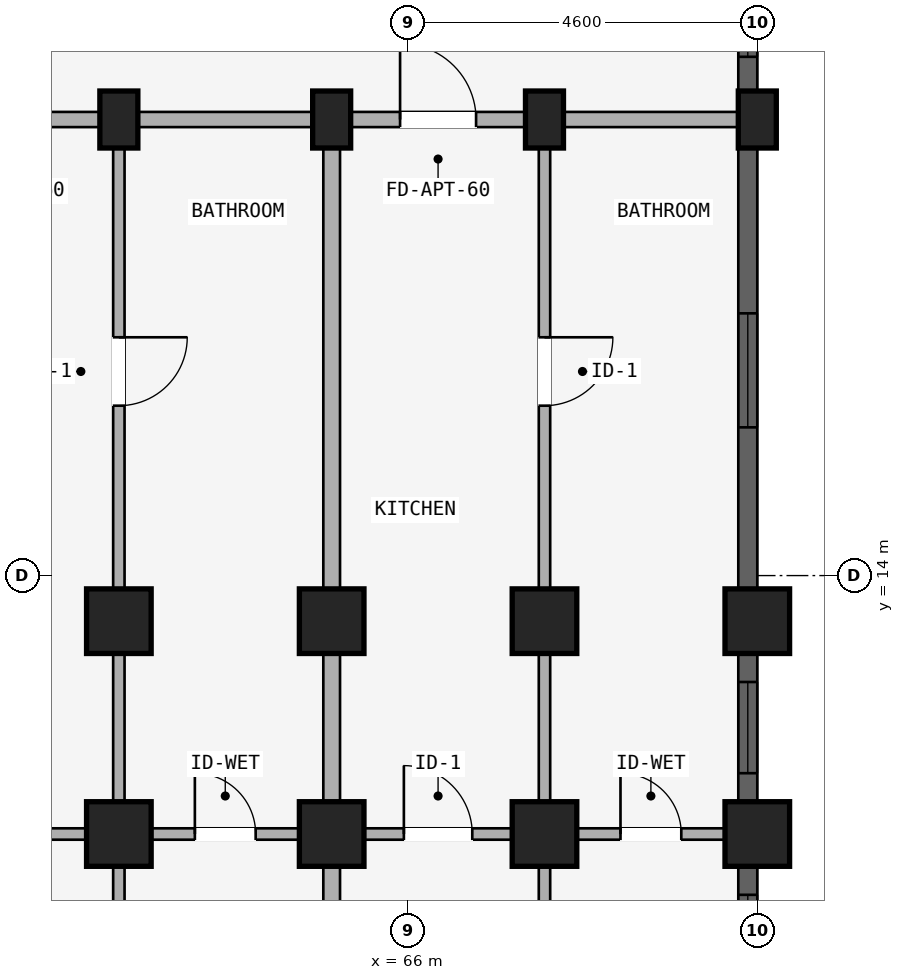
"""IFC4 building model, lengths in metres.
Left out: names, types, materials, properties, quantities, classifications, styles, units other than length and angle.
Written with IfcOpenShell. Run it as: python <this file> out.ifc"""

import sys

from ifc_helpers import new_model, si_unit, direction, frame, frame_2d, origin, origin_2d, place, context, subcontext, project, spatial, rectangle, extrude, element, fill, save


model = new_model("IFC4")
c1 = context("Model", 3, precision=1e-05, world=origin(), true_north=direction((0.0, 1.0)))
c2 = subcontext(c1, "Body", "Model", "MODEL_VIEW")
j1 = project(units=[si_unit("LENGTHUNIT", "METRE"), si_unit("PLANEANGLEUNIT", "RADIAN")], contexts=[c1])
p1 = place(None, origin())
s1 = spatial("IfcSite", under=j1, at=p1, CompositionType="ELEMENT")
p2 = place(p1, origin())
s2 = spatial("IfcBuilding", under=s1, at=p2, CompositionType="ELEMENT")
p3 = place(p2, frame((0.0, 0.0, 4.5)))
s3 = spatial("IfcBuildingStorey", under=s2, at=p3, CompositionType="ELEMENT", Elevation=4.5)
p4 = place(p3, frame((62.2, 20.0, 0.0), z_axis=(0.0, 0.0, 1.0), x_axis=(1.0, 0.0, 0.0)))
e1 = element("IfcColumn", 1, at=p4, inside=s3, PredefinedType="COLUMN", context=c2, shape_type="SweptSolid", body=[
    extrude(rectangle(XDim=0.5, YDim=0.75, at=origin_2d()), origin(), (0.0, 0.0, 1.0), 3.98),
])
for number, where, z_axis, x_axis in (
    (2, (62.2, 13.4, 0.0), (0.0, 0.0, 1.0), (1.0, 0.0, 0.0)),
    (3, (62.2, 10.6, 0.0), (0.0, 0.0, 1.0), (1.0, 0.0, 0.0)),
):
    element("IfcColumn", number, at=place(p3, frame(where, z_axis=z_axis, x_axis=x_axis)), inside=s3, PredefinedType="COLUMN", context=c2, shape_type="SweptSolid", body=[
        extrude(rectangle(XDim=0.85, YDim=0.85, at=origin_2d()), origin(), (0.0, 0.0, 1.0), 3.98),
    ])
p5 = place(p3, frame((65.0, 20.0, 0.0), z_axis=(0.0, 0.0, 1.0), x_axis=(1.0, 0.0, 0.0)))
e4 = element("IfcColumn", 4, at=p5, inside=s3, PredefinedType="COLUMN", context=c2, shape_type="SweptSolid", body=[
    extrude(rectangle(XDim=0.5, YDim=0.75, at=origin_2d()), origin(), (0.0, 0.0, 1.0), 3.98),
])
for number, where, z_axis, x_axis in (
    (5, (65.0, 13.4, 0.0), (0.0, 0.0, 1.0), (1.0, 0.0, 0.0)),
    (6, (65.0, 10.6, 0.0), (0.0, 0.0, 1.0), (1.0, 0.0, 0.0)),
):
    element("IfcColumn", number, at=place(p3, frame(where, z_axis=z_axis, x_axis=x_axis)), inside=s3, PredefinedType="COLUMN", context=c2, shape_type="SweptSolid", body=[
        extrude(rectangle(XDim=0.85, YDim=0.85, at=origin_2d()), origin(), (0.0, 0.0, 1.0), 3.98),
    ])
p6 = place(p3, frame((67.8, 20.0, 0.0), z_axis=(0.0, 0.0, 1.0), x_axis=(1.0, 0.0, 0.0)))
e7 = element("IfcColumn", 7, at=p6, inside=s3, PredefinedType="COLUMN", context=c2, shape_type="SweptSolid", body=[
    extrude(rectangle(XDim=0.5, YDim=0.75, at=origin_2d()), origin(), (0.0, 0.0, 1.0), 3.98),
])
for number, where, z_axis, x_axis in (
    (8, (67.8, 13.4, 0.0), (0.0, 0.0, 1.0), (1.0, 0.0, 0.0)),
    (9, (67.8, 10.6, 0.0), (0.0, 0.0, 1.0), (1.0, 0.0, 0.0)),
):
    element("IfcColumn", number, at=place(p3, frame(where, z_axis=z_axis, x_axis=x_axis)), inside=s3, PredefinedType="COLUMN", context=c2, shape_type="SweptSolid", body=[
        extrude(rectangle(XDim=0.85, YDim=0.85, at=origin_2d()), origin(), (0.0, 0.0, 1.0), 3.98),
    ])
p7 = place(p3, frame((70.6, 20.0, 0.0), z_axis=(0.0, 0.0, 1.0), x_axis=(1.0, 0.0, 0.0)))
e10 = element("IfcColumn", 10, at=p7, inside=s3, PredefinedType="COLUMN", context=c2, shape_type="SweptSolid", body=[
    extrude(rectangle(XDim=0.5, YDim=0.75, at=origin_2d()), origin(), (0.0, 0.0, 1.0), 3.98),
])
for number, where, z_axis, x_axis in (
    (11, (70.6, 13.4, 0.0), (0.0, 0.0, 1.0), (1.0, 0.0, 0.0)),
    (12, (70.6, 10.6, 0.0), (0.0, 0.0, 1.0), (1.0, 0.0, 0.0)),
):
    element("IfcColumn", number, at=place(p3, frame(where, z_axis=z_axis, x_axis=x_axis)), inside=s3, PredefinedType="COLUMN", context=c2, shape_type="SweptSolid", body=[
        extrude(rectangle(XDim=0.85, YDim=0.85, at=origin_2d()), origin(), (0.0, 0.0, 1.0), 3.98),
    ])
p8 = place(p3, frame((59.4, 20.0, 0.0), z_axis=(0.0, 0.0, 1.0), x_axis=(1.0, 0.0, 0.0)))
e13 = element("IfcWall", 13, at=p8, inside=s3, PredefinedType="STANDARD", context=c2, shape_type="SweptSolid", body=[
    extrude(rectangle(XDim=2.8, YDim=0.2, at=frame_2d((1.4, 0.0))), origin(), (0.0, 0.0, 1.0), 3.322),
])
p9 = place(p8, frame((0.9, 0.0, 0.0)))
e14 = element("IfcOpeningElement", 14, at=p9, cuts=e13, PredefinedType="OPENING", context=c2, shape_type="SweptSolid", body=[
    extrude(rectangle(XDim=1.0, YDim=2.15, at=frame_2d((0.5, 1.075))), frame((0.0, 0.11, 0.0), z_axis=(0.0, -1.0, 0.0), x_axis=(1.0, 0.0, 0.0)), (0.0, 0.0, 1.0), 0.22),
])
p10 = place(p3, frame((59.48, 10.6, 0.0), z_axis=(0.0, 0.0, 1.0), x_axis=(1.0, 0.0, 0.0)))
e15 = element("IfcWall", 15, at=p10, inside=s3, PredefinedType="PLUMBINGWALL", context=c2, shape_type="SweptSolid", body=[
    extrude(rectangle(XDim=2.64, YDim=0.15, at=frame_2d((1.32, 0.0))), origin(), (0.0, 0.0, 1.0), 3.322),
])
p11 = place(p10, frame((0.87, 0.0, 0.0)))
e16 = element("IfcOpeningElement", 16, at=p11, cuts=e15, PredefinedType="OPENING", context=c2, shape_type="SweptSolid", body=[
    extrude(rectangle(XDim=0.9, YDim=2.1, at=frame_2d((0.45, 1.05))), frame((0.0, 0.085, 0.0), z_axis=(0.0, -1.0, 0.0), x_axis=(1.0, 0.0, 0.0)), (0.0, 0.0, 1.0), 0.17),
])
p12 = place(p3, frame((62.2, 20.0, 0.0), z_axis=(0.0, 0.0, 1.0), x_axis=(1.0, 0.0, 0.0)))
e17 = element("IfcWall", 17, at=p12, inside=s3, PredefinedType="STANDARD", context=c2, shape_type="SweptSolid", body=[
    extrude(rectangle(XDim=2.8, YDim=0.2, at=frame_2d((1.4, 0.0))), origin(), (0.0, 0.0, 1.0), 3.322),
])
p13 = place(p3, frame((62.28, 10.6, 0.0), z_axis=(0.0, 0.0, 1.0), x_axis=(1.0, 0.0, 0.0)))
e18 = element("IfcWall", 18, at=p13, inside=s3, PredefinedType="PLUMBINGWALL", context=c2, shape_type="SweptSolid", body=[
    extrude(rectangle(XDim=2.64, YDim=0.15, at=frame_2d((1.32, 0.0))), origin(), (0.0, 0.0, 1.0), 3.322),
])
p14 = place(p13, frame((0.92, 0.0, 0.0)))
e19 = element("IfcOpeningElement", 19, at=p14, cuts=e18, PredefinedType="OPENING", context=c2, shape_type="SweptSolid", body=[
    extrude(rectangle(XDim=0.8, YDim=2.1, at=frame_2d((0.4, 1.05))), frame((0.0, 0.085, 0.0), z_axis=(0.0, -1.0, 0.0), x_axis=(1.0, 0.0, 0.0)), (0.0, 0.0, 1.0), 0.17),
])
p15 = place(p3, frame((65.0, 20.0, 0.0), z_axis=(0.0, 0.0, 1.0), x_axis=(1.0, 0.0, 0.0)))
e20 = element("IfcWall", 20, at=p15, inside=s3, PredefinedType="STANDARD", context=c2, shape_type="SweptSolid", body=[
    extrude(rectangle(XDim=2.8, YDim=0.2, at=frame_2d((1.4, 0.0))), origin(), (0.0, 0.0, 1.0), 3.322),
])
p16 = place(p15, frame((0.9, 0.0, 0.0)))
e21 = element("IfcOpeningElement", 21, at=p16, cuts=e20, PredefinedType="OPENING", context=c2, shape_type="SweptSolid", body=[
    extrude(rectangle(XDim=1.0, YDim=2.15, at=frame_2d((0.5, 1.075))), frame((0.0, 0.11, 0.0), z_axis=(0.0, -1.0, 0.0), x_axis=(1.0, 0.0, 0.0)), (0.0, 0.0, 1.0), 0.22),
])
p17 = place(p3, frame((65.08, 10.6, 0.0), z_axis=(0.0, 0.0, 1.0), x_axis=(1.0, 0.0, 0.0)))
e22 = element("IfcWall", 22, at=p17, inside=s3, PredefinedType="PLUMBINGWALL", context=c2, shape_type="SweptSolid", body=[
    extrude(rectangle(XDim=2.64, YDim=0.15, at=frame_2d((1.32, 0.0))), origin(), (0.0, 0.0, 1.0), 3.322),
])
p18 = place(p17, frame((0.87, 0.0, 0.0)))
e23 = element("IfcOpeningElement", 23, at=p18, cuts=e22, PredefinedType="OPENING", context=c2, shape_type="SweptSolid", body=[
    extrude(rectangle(XDim=0.9, YDim=2.1, at=frame_2d((0.45, 1.05))), frame((0.0, 0.085, 0.0), z_axis=(0.0, -1.0, 0.0), x_axis=(1.0, 0.0, 0.0)), (0.0, 0.0, 1.0), 0.17),
])
p19 = place(p3, frame((67.8, 20.0, 0.0), z_axis=(0.0, 0.0, 1.0), x_axis=(1.0, 0.0, 0.0)))
e24 = element("IfcWall", 24, at=p19, inside=s3, PredefinedType="STANDARD", context=c2, shape_type="SweptSolid", body=[
    extrude(rectangle(XDim=2.8, YDim=0.2, at=frame_2d((1.4, 0.0))), origin(), (0.0, 0.0, 1.0), 3.322),
])
p20 = place(p3, frame((67.88, 10.6, 0.0), z_axis=(0.0, 0.0, 1.0), x_axis=(1.0, 0.0, 0.0)))
e25 = element("IfcWall", 25, at=p20, inside=s3, PredefinedType="PLUMBINGWALL", context=c2, shape_type="SweptSolid", body=[
    extrude(rectangle(XDim=2.64, YDim=0.15, at=frame_2d((1.32, 0.0))), origin(), (0.0, 0.0, 1.0), 3.322),
])
p21 = place(p20, frame((0.92, 0.0, 0.0)))
e26 = element("IfcOpeningElement", 26, at=p21, cuts=e25, PredefinedType="OPENING", context=c2, shape_type="SweptSolid", body=[
    extrude(rectangle(XDim=0.8, YDim=2.1, at=frame_2d((0.4, 1.05))), frame((0.0, 0.085, 0.0), z_axis=(0.0, -1.0, 0.0), x_axis=(1.0, 0.0, 0.0)), (0.0, 0.0, 1.0), 0.17),
])
p22 = place(p3, frame((62.2, 19.95, 0.0), z_axis=(0.0, 0.0, 1.0), x_axis=(0.0, -1.0, 0.0)))
e27 = element("IfcWall", 27, at=p22, inside=s3, PredefinedType="PARTITIONING", context=c2, shape_type="SweptSolid", body=[
    extrude(rectangle(XDim=6.53, YDim=0.15, at=frame_2d((3.265, 0.0))), origin(), (0.0, 0.0, 1.0), 3.322),
])
p23 = place(p22, frame((2.815, 0.0, 0.0)))
e28 = element("IfcOpeningElement", 28, at=p23, cuts=e27, PredefinedType="OPENING", context=c2, shape_type="SweptSolid", body=[
    extrude(rectangle(XDim=0.9, YDim=2.1, at=frame_2d((0.45, 1.05))), frame((0.0, 0.085, 0.0), z_axis=(0.0, -1.0, 0.0), x_axis=(1.0, 0.0, 0.0)), (0.0, 0.0, 1.0), 0.17),
])
p24 = place(p3, frame((62.2, 13.3, 0.0), z_axis=(0.0, 0.0, 1.0), x_axis=(0.0, -1.0, 0.0)))
e29 = element("IfcWall", 29, at=p24, inside=s3, PredefinedType="PARTITIONING", context=c2, shape_type="SweptSolid", body=[
    extrude(rectangle(XDim=10.82, YDim=0.15, at=frame_2d((5.41, 0.0))), origin(), (0.0, 0.0, 1.0), 3.322),
])
p25 = place(p24, frame((3.7, 0.0, 0.0)))
e30 = element("IfcOpeningElement", 30, at=p25, cuts=e29, PredefinedType="OPENING", context=c2, shape_type="SweptSolid", body=[
    extrude(rectangle(XDim=0.8, YDim=2.1, at=frame_2d((0.4, 1.05))), frame((0.0, 0.085, 0.0), z_axis=(0.0, -1.0, 0.0), x_axis=(1.0, 0.0, 0.0)), (0.0, 0.0, 1.0), 0.17),
])
p26 = place(p3, frame((65.0, 19.95, 0.0), z_axis=(0.0, 0.0, 1.0), x_axis=(0.0, -1.0, 0.0)))
e31 = element("IfcWall", 31, at=p26, inside=s3, PredefinedType="STANDARD", context=c2, shape_type="SweptSolid", body=[
    extrude(rectangle(XDim=6.53, YDim=0.22, at=frame_2d((3.265, 0.0))), origin(), (0.0, 0.0, 1.0), 3.322),
])
p27 = place(p3, frame((65.0, 13.3, 0.0), z_axis=(0.0, 0.0, 1.0), x_axis=(0.0, -1.0, 0.0)))
e32 = element("IfcWall", 32, at=p27, inside=s3, PredefinedType="STANDARD", context=c2, shape_type="SweptSolid", body=[
    extrude(rectangle(XDim=10.82, YDim=0.22, at=frame_2d((5.41, 0.0))), origin(), (0.0, 0.0, 1.0), 3.322),
])
p28 = place(p3, frame((67.8, 19.95, 0.0), z_axis=(0.0, 0.0, 1.0), x_axis=(0.0, -1.0, 0.0)))
e33 = element("IfcWall", 33, at=p28, inside=s3, PredefinedType="PARTITIONING", context=c2, shape_type="SweptSolid", body=[
    extrude(rectangle(XDim=6.53, YDim=0.15, at=frame_2d((3.265, 0.0))), origin(), (0.0, 0.0, 1.0), 3.322),
])
p29 = place(p28, frame((2.815, 0.0, 0.0)))
e34 = element("IfcOpeningElement", 34, at=p29, cuts=e33, PredefinedType="OPENING", context=c2, shape_type="SweptSolid", body=[
    extrude(rectangle(XDim=0.9, YDim=2.1, at=frame_2d((0.45, 1.05))), frame((0.0, 0.085, 0.0), z_axis=(0.0, -1.0, 0.0), x_axis=(1.0, 0.0, 0.0)), (0.0, 0.0, 1.0), 0.17),
])
p30 = place(p3, frame((67.8, 13.3, 0.0), z_axis=(0.0, 0.0, 1.0), x_axis=(0.0, -1.0, 0.0)))
e35 = element("IfcWall", 35, at=p30, inside=s3, PredefinedType="PARTITIONING", context=c2, shape_type="SweptSolid", body=[
    extrude(rectangle(XDim=10.82, YDim=0.15, at=frame_2d((5.41, 0.0))), origin(), (0.0, 0.0, 1.0), 3.322),
])
p31 = place(p30, frame((3.7, 0.0, 0.0)))
e36 = element("IfcOpeningElement", 36, at=p31, cuts=e35, PredefinedType="OPENING", context=c2, shape_type="SweptSolid", body=[
    extrude(rectangle(XDim=0.8, YDim=2.1, at=frame_2d((0.4, 1.05))), frame((0.0, 0.085, 0.0), z_axis=(0.0, -1.0, 0.0), x_axis=(1.0, 0.0, 0.0)), (0.0, 0.0, 1.0), 0.17),
])
p32 = place(p3, frame((70.475, 22.021, 0.0), z_axis=(0.0, 0.0, 1.0), x_axis=(0.0, -1.0, 0.0)))
e37 = element("IfcWall", 37, at=p32, inside=s3, PredefinedType="STANDARD", context=c2, shape_type="SweptSolid", body=[
    extrude(rectangle(XDim=1.643, YDim=0.25, at=frame_2d((0.822, 0.0))), origin(), (0.0, 0.0, 1.0), 3.322),
])
p33 = place(p32, frame((0.447, 0.0, 0.88)))
e38 = element("IfcOpeningElement", 38, at=p33, cuts=e37, PredefinedType="OPENING", context=c2, shape_type="SweptSolid", body=[
    extrude(rectangle(XDim=0.75, YDim=1.05, at=frame_2d((0.375, 0.525))), frame((0.0, 0.135, 0.0), z_axis=(0.0, -1.0, 0.0), x_axis=(1.0, 0.0, 0.0)), (0.0, 0.0, 1.0), 0.27),
])
p34 = place(p3, frame((70.475, 19.622, 0.0), z_axis=(0.0, 0.0, 1.0), x_axis=(0.0, -1.0, 0.0)))
e39 = element("IfcWall", 39, at=p34, inside=s3, PredefinedType="STANDARD", context=c2, shape_type="SweptSolid", body=[
    extrude(rectangle(XDim=5.802, YDim=0.25, at=frame_2d((2.901, 0.0))), origin(), (0.0, 0.0, 1.0), 3.322),
])
p35 = place(p34, frame((2.171, 0.0, 0.88)))
e40 = element("IfcOpeningElement", 40, at=p35, cuts=e39, PredefinedType="OPENING", context=c2, shape_type="SweptSolid", body=[
    extrude(rectangle(XDim=1.5, YDim=1.65, at=frame_2d((0.75, 0.825))), frame((0.0, 0.135, 0.0), z_axis=(0.0, -1.0, 0.0), x_axis=(1.0, 0.0, 0.0)), (0.0, 0.0, 1.0), 0.27),
])
p36 = place(p3, frame((70.475, 12.98, 0.0), z_axis=(0.0, 0.0, 1.0), x_axis=(0.0, -1.0, 0.0)))
e41 = element("IfcWall", 41, at=p36, inside=s3, PredefinedType="STANDARD", context=c2, shape_type="SweptSolid", body=[
    extrude(rectangle(XDim=1.96, YDim=0.25, at=frame_2d((0.98, 0.0))), origin(), (0.0, 0.0, 1.0), 3.322),
])
p37 = place(p36, frame((0.38, 0.0, 0.88)))
e42 = element("IfcOpeningElement", 42, at=p37, cuts=e41, PredefinedType="OPENING", context=c2, shape_type="SweptSolid", body=[
    extrude(rectangle(XDim=1.2, YDim=1.5, at=frame_2d((0.6, 0.75))), frame((0.0, 0.135, 0.0), z_axis=(0.0, -1.0, 0.0), x_axis=(1.0, 0.0, 0.0)), (0.0, 0.0, 1.0), 0.27),
])
p38 = place(p3, frame((70.475, 10.18, 0.0), z_axis=(0.0, 0.0, 1.0), x_axis=(0.0, -1.0, 0.0)))
e43 = element("IfcWall", 43, at=p38, inside=s3, PredefinedType="STANDARD", context=c2, shape_type="SweptSolid", body=[
    extrude(rectangle(XDim=1.96, YDim=0.25, at=frame_2d((0.98, 0.0))), origin(), (0.0, 0.0, 1.0), 3.322),
])
p39 = place(p38, frame((0.38, 0.0, 0.88)))
e44 = element("IfcOpeningElement", 44, at=p39, cuts=e43, PredefinedType="OPENING", context=c2, shape_type="SweptSolid", body=[
    extrude(rectangle(XDim=1.2, YDim=1.5, at=frame_2d((0.6, 0.75))), frame((0.0, 0.135, 0.0), z_axis=(0.0, -1.0, 0.0), x_axis=(1.0, 0.0, 0.0)), (0.0, 0.0, 1.0), 0.27),
])
p40 = place(p33, origin())
e45 = element("IfcWindow", 45, at=p40, inside=s3, PartitioningType="SINGLE_PANEL", PredefinedType="WINDOW", context=c2, shape_type="SweptSolid", body=[
    extrude(rectangle(XDim=0.75, YDim=1.05, at=frame_2d((0.375, 0.525))), frame((0.0, 0.03, 0.0), z_axis=(0.0, -1.0, 0.0), x_axis=(1.0, 0.0, 0.0)), (0.0, 0.0, 1.0), 0.06),
])
fill(e38, e45)
p41 = place(p35, origin())
e46 = element("IfcWindow", 46, at=p41, inside=s3, PartitioningType="DOUBLE_PANEL_VERTICAL", PredefinedType="WINDOW", context=c2, shape_type="SweptSolid", body=[
    extrude(rectangle(XDim=1.5, YDim=1.65, at=frame_2d((0.75, 0.825))), frame((0.0, 0.03, 0.0), z_axis=(0.0, -1.0, 0.0), x_axis=(1.0, 0.0, 0.0)), (0.0, 0.0, 1.0), 0.06),
])
fill(e40, e46)
p42 = place(p37, origin())
e47 = element("IfcWindow", 47, at=p42, inside=s3, PartitioningType="SINGLE_PANEL", PredefinedType="WINDOW", context=c2, shape_type="SweptSolid", body=[
    extrude(rectangle(XDim=1.2, YDim=1.5, at=frame_2d((0.6, 0.75))), frame((0.0, 0.03, 0.0), z_axis=(0.0, -1.0, 0.0), x_axis=(1.0, 0.0, 0.0)), (0.0, 0.0, 1.0), 0.06),
])
fill(e42, e47)
p43 = place(p39, origin())
e48 = element("IfcWindow", 48, at=p43, inside=s3, PartitioningType="SINGLE_PANEL", PredefinedType="WINDOW", context=c2, shape_type="SweptSolid", body=[
    extrude(rectangle(XDim=1.2, YDim=1.5, at=frame_2d((0.6, 0.75))), frame((0.0, 0.03, 0.0), z_axis=(0.0, -1.0, 0.0), x_axis=(1.0, 0.0, 0.0)), (0.0, 0.0, 1.0), 0.06),
])
fill(e44, e48)
p44 = place(p14, frame((0.8, 0.0, 0.0), z_axis=(0.0, 0.0, 1.0), x_axis=(-1.0, 0.0, 0.0)))
e49 = element("IfcDoor", 49, at=p44, inside=s3, OperationType="SINGLE_SWING_RIGHT", PredefinedType="DOOR", context=c2, shape_type="SweptSolid", body=[
    extrude(rectangle(XDim=0.8, YDim=2.1, at=frame_2d((0.4, 1.05))), frame((0.0, 0.025, 0.0), z_axis=(0.0, -1.0, 0.0), x_axis=(1.0, 0.0, 0.0)), (0.0, 0.0, 1.0), 0.05),
])
fill(e19, e49)
p45 = place(p18, frame((0.9, 0.0, 0.0), z_axis=(0.0, 0.0, 1.0), x_axis=(-1.0, 0.0, 0.0)))
e50 = element("IfcDoor", 50, at=p45, inside=s3, OperationType="SINGLE_SWING_RIGHT", PredefinedType="DOOR", context=c2, shape_type="SweptSolid", body=[
    extrude(rectangle(XDim=0.9, YDim=2.1, at=frame_2d((0.45, 1.05))), frame((0.0, 0.025, 0.0), z_axis=(0.0, -1.0, 0.0), x_axis=(1.0, 0.0, 0.0)), (0.0, 0.0, 1.0), 0.05),
])
fill(e23, e50)
p46 = place(p16, origin())
e51 = element("IfcDoor", 51, at=p46, inside=s3, OperationType="SINGLE_SWING_LEFT", PredefinedType="DOOR", context=c2, shape_type="SweptSolid", body=[
    extrude(rectangle(XDim=1.0, YDim=2.15, at=frame_2d((0.5, 1.075))), frame((0.0, 0.025, 0.0), z_axis=(0.0, -1.0, 0.0), x_axis=(1.0, 0.0, 0.0)), (0.0, 0.0, 1.0), 0.05),
])
fill(e21, e51)
p47 = place(p21, frame((0.8, 0.0, 0.0), z_axis=(0.0, 0.0, 1.0), x_axis=(-1.0, 0.0, 0.0)))
e52 = element("IfcDoor", 52, at=p47, inside=s3, OperationType="SINGLE_SWING_RIGHT", PredefinedType="DOOR", context=c2, shape_type="SweptSolid", body=[
    extrude(rectangle(XDim=0.8, YDim=2.1, at=frame_2d((0.4, 1.05))), frame((0.0, 0.025, 0.0), z_axis=(0.0, -1.0, 0.0), x_axis=(1.0, 0.0, 0.0)), (0.0, 0.0, 1.0), 0.05),
])
fill(e26, e52)
p48 = place(p23, origin())
e53 = element("IfcDoor", 53, at=p48, inside=s3, OperationType="SINGLE_SWING_LEFT", PredefinedType="DOOR", context=c2, shape_type="SweptSolid", body=[
    extrude(rectangle(XDim=0.9, YDim=2.1, at=frame_2d((0.45, 1.05))), frame((0.0, 0.025, 0.0), z_axis=(0.0, -1.0, 0.0), x_axis=(1.0, 0.0, 0.0)), (0.0, 0.0, 1.0), 0.05),
])
fill(e28, e53)
p49 = place(p29, frame((0.9, 0.0, 0.0), z_axis=(0.0, 0.0, 1.0), x_axis=(-1.0, 0.0, 0.0)))
e54 = element("IfcDoor", 54, at=p49, inside=s3, OperationType="SINGLE_SWING_RIGHT", PredefinedType="DOOR", context=c2, shape_type="SweptSolid", body=[
    extrude(rectangle(XDim=0.9, YDim=2.1, at=frame_2d((0.45, 1.05))), frame((0.0, 0.025, 0.0), z_axis=(0.0, -1.0, 0.0), x_axis=(1.0, 0.0, 0.0)), (0.0, 0.0, 1.0), 0.05),
])
fill(e34, e54)
save(model, sys.argv[1])
